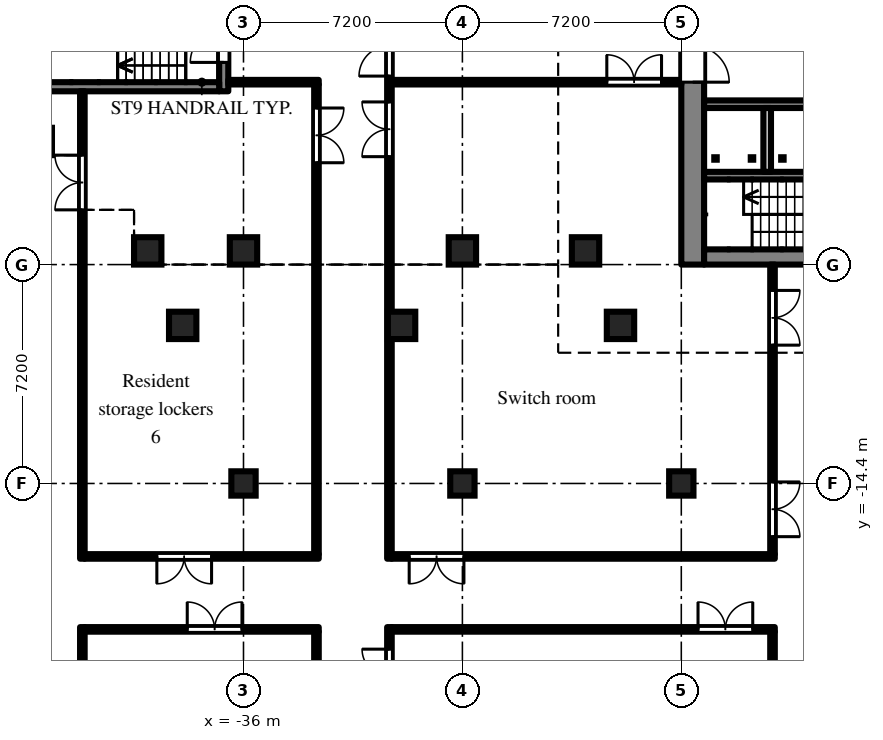
"""IFC4 building model, lengths in metres.
Left out: names, types, materials, properties, quantities, classifications, styles, units other than length and angle.
Written with IfcOpenShell. Run it as: python <this file> out.ifc"""

import sys

from ifc_helpers import new_model, si_unit, direction, frame, frame_2d, origin, origin_2d, place, context, subcontext, project, spatial, rectangle, extrude, element, fill, save


model = new_model("IFC4")
c1 = context("Model", 3, precision=1e-05, world=origin(), true_north=direction((0.0, 1.0)))
c2 = subcontext(c1, "Body", "Model", "MODEL_VIEW")
j1 = project(units=[si_unit("LENGTHUNIT", "METRE"), si_unit("PLANEANGLEUNIT", "RADIAN")], contexts=[c1])
p1 = place(None, origin())
s1 = spatial("IfcSite", under=j1, at=p1, CompositionType="ELEMENT")
p2 = place(p1, origin())
s2 = spatial("IfcBuilding", under=s1, at=p2, CompositionType="ELEMENT")
p3 = place(p2, frame((0.0, 0.0, -4.8)))
s3 = spatial("IfcBuildingStorey", under=s2, at=p3, CompositionType="ELEMENT", Elevation=-4.8)
for number, where, z_axis, x_axis in (
    (1, (-39.15, -6.75, -0.5), (0.0, 0.0, 1.0), (1.0, 0.0, 0.0)),
    (2, (-36.0, -6.75, -0.5), (0.0, 0.0, 1.0), (1.0, 0.0, 0.0)),
    (3, (-28.8, -6.75, -0.5), (0.0, 0.0, 1.0), (1.0, 0.0, 0.0)),
    (4, (-24.75, -6.75, -0.5), (0.0, 0.0, 1.0), (1.0, 0.0, 0.0)),
):
    element("IfcColumn", number, at=place(p3, frame(where, z_axis=z_axis, x_axis=x_axis)), inside=s3, PredefinedType="COLUMN", context=c2, shape_type="SweptSolid", body=[
        extrude(rectangle(XDim=0.9, YDim=0.9, at=origin_2d()), origin(), (0.0, 0.0, 1.0), 5.3),
    ])
for number, where, z_axis, x_axis in (
    (5, (-36.0, -14.4, -0.5), (0.0, 0.0, 1.0), (1.0, 0.0, 0.0)),
    (6, (-28.8, -14.4, -0.5), (0.0, 0.0, 1.0), (1.0, 0.0, 0.0)),
    (7, (-21.6, -14.4, -0.5), (0.0, 0.0, 1.0), (1.0, 0.0, 0.0)),
):
    element("IfcColumn", number, at=place(p3, frame(where, z_axis=z_axis, x_axis=x_axis)), inside=s3, PredefinedType="COLUMN", context=c2, shape_type="SweptSolid", body=[
        extrude(rectangle(XDim=0.8, YDim=0.8, at=origin_2d()), origin(), (0.0, 0.0, 1.0), 5.3),
    ])
for number, where, z_axis, x_axis in (
    (8, (-38.0, -9.2, -0.5), (0.0, 0.0, 1.0), (1.0, 0.0, 0.0)),
    (9, (-30.8, -9.2, -0.5), (0.0, 0.0, 1.0), (1.0, 0.0, 0.0)),
    (10, (-23.6, -9.2, -0.5), (0.0, 0.0, 1.0), (1.0, 0.0, 0.0)),
):
    element("IfcColumn", number, at=place(p3, frame(where, z_axis=z_axis, x_axis=x_axis)), inside=s3, PredefinedType="COLUMN", context=c2, shape_type="SweptSolid", body=[
        extrude(rectangle(XDim=0.9, YDim=0.9, at=origin_2d()), origin(), (0.0, 0.0, 1.0), 5.3),
    ])
p4 = place(p3, frame((-21.225, -7.2, 0.0), z_axis=(0.0, 0.0, 1.0), x_axis=(0.0, 1.0, 0.0)))
e11 = element("IfcWall", 11, at=p4, inside=s3, PredefinedType="SHEAR", context=c2, shape_type="SweptSolid", body=[
    extrude(rectangle(XDim=14.4, YDim=0.75, at=frame_2d((7.2, 0.0))), origin(), (0.0, 0.0, 1.0), 4.35),
])
p5 = place(p4, frame((6.0, 0.0, 0.0)))
e12 = element("IfcOpeningElement", 12, at=p5, cuts=e11, PredefinedType="OPENING", context=c2, shape_type="SweptSolid", body=[
    extrude(rectangle(XDim=2.4, YDim=2.2, at=frame_2d((1.2, 1.1))), frame((0.0, 0.385, 0.0), z_axis=(0.0, -1.0, 0.0), x_axis=(1.0, 0.0, 0.0)), (0.0, 0.0, 1.0), 0.77),
])
p6 = place(p3, frame((-7.9, -6.95, 0.0), z_axis=(0.0, 0.0, 1.0), x_axis=(-1.0, 0.0, 0.0)))
e13 = element("IfcWall", 13, at=p6, inside=s3, PredefinedType="SHEAR", context=c2, shape_type="SweptSolid", body=[
    extrude(rectangle(XDim=12.95, YDim=0.5, at=frame_2d((6.475, 0.0))), origin(), (0.0, 0.0, 1.0), 4.35),
])
p7 = place(p3, frame((-7.9, -1.925, 0.0), z_axis=(0.0, 0.0, 1.0), x_axis=(-1.0, 0.0, 0.0)))
e14 = element("IfcWall", 14, at=p7, inside=s3, PredefinedType="SHEAR", context=c2, shape_type="SweptSolid", body=[
    extrude(rectangle(XDim=12.95, YDim=0.25, at=frame_2d((6.475, 0.0))), origin(), (0.0, 0.0, 1.0), 4.35),
])
p8 = place(p7, frame((0.525, 0.0, 0.0)))
e15 = element("IfcOpeningElement", 15, at=p8, cuts=e14, PredefinedType="OPENING", context=c2, shape_type="SweptSolid", body=[
    extrude(rectangle(XDim=0.9, YDim=2.1, at=frame_2d((0.45, 1.05))), frame((0.0, 0.135, 0.0), z_axis=(0.0, -1.0, 0.0), x_axis=(1.0, 0.0, 0.0)), (0.0, 0.0, 1.0), 0.27),
])
p9 = place(p7, frame((2.625, 0.0, 0.0)))
e16 = element("IfcOpeningElement", 16, at=p9, cuts=e14, PredefinedType="OPENING", context=c2, shape_type="SweptSolid", body=[
    extrude(rectangle(XDim=1.1, YDim=2.1, at=frame_2d((0.55, 1.05))), frame((0.0, 0.135, 0.0), z_axis=(0.0, -1.0, 0.0), x_axis=(1.0, 0.0, 0.0)), (0.0, 0.0, 1.0), 0.27),
])
p10 = place(p3, frame((-12.3, -4.275, 0.0), z_axis=(0.0, 0.0, 1.0), x_axis=(-1.0, 0.0, 0.0)))
e17 = element("IfcWall", 17, at=p10, inside=s3, PredefinedType="SHEAR", context=c2, shape_type="SweptSolid", body=[
    extrude(rectangle(XDim=8.55, YDim=0.25, at=frame_2d((4.275, 0.0))), origin(), (0.0, 0.0, 1.0), 4.35),
])
p11 = place(p3, frame((-18.775, -2.05, 0.0), z_axis=(0.0, 0.0, 1.0), x_axis=(0.0, -1.0, 0.0)))
e18 = element("IfcWall", 18, at=p11, inside=s3, PredefinedType="PARTITIONING", context=c2, shape_type="SweptSolid", body=[
    extrude(rectangle(XDim=2.1, YDim=0.25, at=frame_2d((1.05, 0.0))), origin(), (0.0, 0.0, 1.0), 4.35),
])
p12 = place(p3, frame((-36.65, -1.5, 0.0), z_axis=(0.0, 0.0, 1.0), x_axis=(0.0, 1.0, 0.0)))
e19 = element("IfcWall", 19, at=p12, inside=s3, PredefinedType="SHEAR", context=c2, shape_type="SweptSolid", body=[
    extrude(rectangle(XDim=3.0, YDim=0.3, at=frame_2d((1.5, 0.0))), origin(), (0.0, 0.0, 1.0), 4.35),
])
p13 = place(p12, frame((0.95, 0.0, 0.0)))
e20 = element("IfcOpeningElement", 20, at=p13, cuts=e19, PredefinedType="OPENING", context=c2, shape_type="SweptSolid", body=[
    extrude(rectangle(XDim=1.1, YDim=2.1, at=frame_2d((0.55, 1.05))), frame((0.0, 0.16, 0.0), z_axis=(0.0, -1.0, 0.0), x_axis=(1.0, 0.0, 0.0)), (0.0, 0.0, 1.0), 0.32),
])
p14 = place(p3, frame((-36.8, -1.35, 0.0), z_axis=(0.0, 0.0, 1.0), x_axis=(-1.0, 0.0, 0.0)))
e21 = element("IfcWall", 21, at=p14, inside=s3, PredefinedType="SHEAR", context=c2, shape_type="SweptSolid", body=[
    extrude(rectangle(XDim=5.8, YDim=0.3, at=frame_2d((2.9, 0.0))), origin(), (0.0, 0.0, 1.0), 4.35),
])
p15 = place(p3, frame((-41.3, -31.275, 0.0), z_axis=(0.0, 0.0, 1.0), x_axis=(0.0, 1.0, 0.0)))
e22 = element("IfcWall", 22, at=p15, inside=s3, PredefinedType="PARTITIONING", context=c2, shape_type="SweptSolid", body=[
    extrude(rectangle(XDim=12.15, YDim=0.15, at=frame_2d((6.075, 0.0))), origin(), (0.0, 0.0, 1.0), 4.35),
])
p16 = place(p3, frame((-41.225, -19.2, 0.0), z_axis=(0.0, 0.0, 1.0), x_axis=(1.0, 0.0, 0.0)))
e23 = element("IfcWall", 23, at=p16, inside=s3, PredefinedType="PARTITIONING", context=c2, shape_type="SweptSolid", body=[
    extrude(rectangle(XDim=7.7, YDim=0.15, at=frame_2d((3.85, 0.0))), origin(), (0.0, 0.0, 1.0), 4.35),
])
p17 = place(p16, frame((3.375, 0.0, 0.0)))
e24 = element("IfcOpeningElement", 24, at=p17, cuts=e23, PredefinedType="OPENING", context=c2, shape_type="SweptSolid", body=[
    extrude(rectangle(XDim=1.8, YDim=2.1, at=frame_2d((0.9, 1.05))), frame((0.0, 0.085, 0.0), z_axis=(0.0, -1.0, 0.0), x_axis=(1.0, 0.0, 0.0)), (0.0, 0.0, 1.0), 0.17),
])
p18 = place(p3, frame((-41.3, -16.875, 0.0), z_axis=(0.0, 0.0, 1.0), x_axis=(0.0, 1.0, 0.0)))
e25 = element("IfcWall", 25, at=p18, inside=s3, PredefinedType="PARTITIONING", context=c2, shape_type="SweptSolid", body=[
    extrude(rectangle(XDim=15.375, YDim=0.15, at=frame_2d((7.688, 0.0))), origin(), (0.0, 0.0, 1.0), 4.35),
])
p19 = place(p18, frame((11.475, 0.0, 0.0)))
e26 = element("IfcOpeningElement", 26, at=p19, cuts=e25, PredefinedType="OPENING", context=c2, shape_type="SweptSolid", body=[
    extrude(rectangle(XDim=1.8, YDim=2.1, at=frame_2d((0.9, 1.05))), frame((0.0, 0.085, 0.0), z_axis=(0.0, -1.0, 0.0), x_axis=(1.0, 0.0, 0.0)), (0.0, 0.0, 1.0), 0.17),
])
p20 = place(p3, frame((-41.225, -16.8, 0.0), z_axis=(0.0, 0.0, 1.0), x_axis=(1.0, 0.0, 0.0)))
e27 = element("IfcWall", 27, at=p20, inside=s3, PredefinedType="PARTITIONING", context=c2, shape_type="SweptSolid", body=[
    extrude(rectangle(XDim=7.7, YDim=0.15, at=frame_2d((3.85, 0.0))), origin(), (0.0, 0.0, 1.0), 4.35),
])
p21 = place(p20, frame((2.375, 0.0, 0.0)))
e28 = element("IfcOpeningElement", 28, at=p21, cuts=e27, PredefinedType="OPENING", context=c2, shape_type="SweptSolid", body=[
    extrude(rectangle(XDim=1.8, YDim=2.1, at=frame_2d((0.9, 1.05))), frame((0.0, 0.085, 0.0), z_axis=(0.0, -1.0, 0.0), x_axis=(1.0, 0.0, 0.0)), (0.0, 0.0, 1.0), 0.17),
])
p22 = place(p3, frame((-36.5, -1.2, 0.0), z_axis=(0.0, 0.0, 1.0), x_axis=(1.0, 0.0, 0.0)))
e29 = element("IfcWall", 29, at=p22, inside=s3, PredefinedType="PARTITIONING", context=c2, shape_type="SweptSolid", body=[
    extrude(rectangle(XDim=2.975, YDim=0.15, at=frame_2d((1.488, 0.0))), origin(), (0.0, 0.0, 1.0), 4.35),
])
p23 = place(p3, frame((-33.6, -31.125, 0.0), z_axis=(0.0, 0.0, 1.0), x_axis=(0.0, 1.0, 0.0)))
e30 = element("IfcWall", 30, at=p23, inside=s3, PredefinedType="PARTITIONING", context=c2, shape_type="SweptSolid", body=[
    extrude(rectangle(XDim=11.85, YDim=0.15, at=frame_2d((5.925, 0.0))), origin(), (0.0, 0.0, 1.0), 4.35),
])
p24 = place(p3, frame((-33.6, -16.725, 0.0), z_axis=(0.0, 0.0, 1.0), x_axis=(0.0, 1.0, 0.0)))
e31 = element("IfcWall", 31, at=p24, inside=s3, PredefinedType="PARTITIONING", context=c2, shape_type="SweptSolid", body=[
    extrude(rectangle(XDim=15.45, YDim=0.15, at=frame_2d((7.725, 0.0))), origin(), (0.0, 0.0, 1.0), 4.35),
])
p25 = place(p24, frame((12.875, 0.0, 0.0)))
e32 = element("IfcOpeningElement", 32, at=p25, cuts=e31, PredefinedType="OPENING", context=c2, shape_type="SweptSolid", body=[
    extrude(rectangle(XDim=1.8, YDim=2.1, at=frame_2d((0.9, 1.05))), frame((0.0, 0.085, 0.0), z_axis=(0.0, -1.0, 0.0), x_axis=(1.0, 0.0, 0.0)), (0.0, 0.0, 1.0), 0.17),
])
p26 = place(p3, frame((-31.2, -31.275, 0.0), z_axis=(0.0, 0.0, 1.0), x_axis=(0.0, 1.0, 0.0)))
e33 = element("IfcWall", 33, at=p26, inside=s3, PredefinedType="PARTITIONING", context=c2, shape_type="SweptSolid", body=[
    extrude(rectangle(XDim=12.15, YDim=0.15, at=frame_2d((6.075, 0.0))), origin(), (0.0, 0.0, 1.0), 4.35),
])
p27 = place(p26, frame((9.625, 0.0, 0.0)))
e34 = element("IfcOpeningElement", 34, at=p27, cuts=e33, PredefinedType="OPENING", context=c2, shape_type="SweptSolid", body=[
    extrude(rectangle(XDim=1.8, YDim=2.1, at=frame_2d((0.9, 1.05))), frame((0.0, 0.085, 0.0), z_axis=(0.0, -1.0, 0.0), x_axis=(1.0, 0.0, 0.0)), (0.0, 0.0, 1.0), 0.17),
])
p28 = place(p3, frame((-31.125, -19.2, 0.0), z_axis=(0.0, 0.0, 1.0), x_axis=(1.0, 0.0, 0.0)))
e35 = element("IfcWall", 35, at=p28, inside=s3, PredefinedType="PARTITIONING", context=c2, shape_type="SweptSolid", body=[
    extrude(rectangle(XDim=12.6, YDim=0.15, at=frame_2d((6.3, 0.0))), origin(), (0.0, 0.0, 1.0), 4.35),
])
p29 = place(p28, frame((10.075, 0.0, 0.0)))
e36 = element("IfcOpeningElement", 36, at=p29, cuts=e35, PredefinedType="OPENING", context=c2, shape_type="SweptSolid", body=[
    extrude(rectangle(XDim=1.8, YDim=2.1, at=frame_2d((0.9, 1.05))), frame((0.0, 0.085, 0.0), z_axis=(0.0, -1.0, 0.0), x_axis=(1.0, 0.0, 0.0)), (0.0, 0.0, 1.0), 0.17),
])
p30 = place(p3, frame((-31.2, -16.875, 0.0), z_axis=(0.0, 0.0, 1.0), x_axis=(0.0, 1.0, 0.0)))
e37 = element("IfcWall", 37, at=p30, inside=s3, PredefinedType="PARTITIONING", context=c2, shape_type="SweptSolid", body=[
    extrude(rectangle(XDim=33.75, YDim=0.15, at=frame_2d((16.875, 0.0))), origin(), (0.0, 0.0, 1.0), 4.35),
])
p31 = place(p30, frame((15.875, 0.0, 0.0)))
e38 = element("IfcOpeningElement", 38, at=p31, cuts=e37, PredefinedType="OPENING", context=c2, shape_type="SweptSolid", body=[
    extrude(rectangle(XDim=2.0, YDim=2.1, at=frame_2d((1.0, 1.05))), frame((0.0, 0.085, 0.0), z_axis=(0.0, -1.0, 0.0), x_axis=(1.0, 0.0, 0.0)), (0.0, 0.0, 1.0), 0.17),
])
p32 = place(p30, frame((31.225, 0.0, 0.0)))
e39 = element("IfcOpeningElement", 39, at=p32, cuts=e37, PredefinedType="OPENING", context=c2, shape_type="SweptSolid", body=[
    extrude(rectangle(XDim=1.8, YDim=2.1, at=frame_2d((0.9, 1.05))), frame((0.0, 0.085, 0.0), z_axis=(0.0, -1.0, 0.0), x_axis=(1.0, 0.0, 0.0)), (0.0, 0.0, 1.0), 0.17),
])
p33 = place(p30, frame((13.225, 0.0, 0.0)))
e40 = element("IfcOpeningElement", 40, at=p33, cuts=e37, PredefinedType="OPENING", context=c2, shape_type="SweptSolid", body=[
    extrude(rectangle(XDim=1.8, YDim=2.1, at=frame_2d((0.9, 1.05))), frame((0.0, 0.085, 0.0), z_axis=(0.0, -1.0, 0.0), x_axis=(1.0, 0.0, 0.0)), (0.0, 0.0, 1.0), 0.17),
])
p34 = place(p3, frame((-31.125, -16.8, 0.0), z_axis=(0.0, 0.0, 1.0), x_axis=(1.0, 0.0, 0.0)))
e41 = element("IfcWall", 41, at=p34, inside=s3, PredefinedType="PARTITIONING", context=c2, shape_type="SweptSolid", body=[
    extrude(rectangle(XDim=12.6, YDim=0.15, at=frame_2d((6.3, 0.0))), origin(), (0.0, 0.0, 1.0), 4.35),
])
p35 = place(p34, frame((0.575, 0.0, 0.0)))
e42 = element("IfcOpeningElement", 42, at=p35, cuts=e41, PredefinedType="OPENING", context=c2, shape_type="SweptSolid", body=[
    extrude(rectangle(XDim=1.8, YDim=2.1, at=frame_2d((0.9, 1.05))), frame((0.0, 0.085, 0.0), z_axis=(0.0, -1.0, 0.0), x_axis=(1.0, 0.0, 0.0)), (0.0, 0.0, 1.0), 0.17),
])
p36 = place(p3, frame((-31.125, -1.2, 0.0), z_axis=(0.0, 0.0, 1.0), x_axis=(1.0, 0.0, 0.0)))
e43 = element("IfcWall", 43, at=p36, inside=s3, PredefinedType="PARTITIONING", context=c2, shape_type="SweptSolid", body=[
    extrude(rectangle(XDim=9.525, YDim=0.15, at=frame_2d((4.762, 0.0))), origin(), (0.0, 0.0, 1.0), 4.35),
])
p37 = place(p36, frame((7.075, 0.0, 0.0)))
e44 = element("IfcOpeningElement", 44, at=p37, cuts=e43, PredefinedType="OPENING", context=c2, shape_type="SweptSolid", body=[
    extrude(rectangle(XDim=1.8, YDim=2.1, at=frame_2d((0.9, 1.05))), frame((0.0, 0.085, 0.0), z_axis=(0.0, -1.0, 0.0), x_axis=(1.0, 0.0, 0.0)), (0.0, 0.0, 1.0), 0.17),
])
p38 = place(p3, frame((-18.6, -31.125, 0.0), z_axis=(0.0, 0.0, 1.0), x_axis=(0.0, 1.0, 0.0)))
e45 = element("IfcWall", 45, at=p38, inside=s3, PredefinedType="PARTITIONING", context=c2, shape_type="SweptSolid", body=[
    extrude(rectangle(XDim=11.85, YDim=0.15, at=frame_2d((5.925, 0.0))), origin(), (0.0, 0.0, 1.0), 4.35),
])
p39 = place(p38, frame((0.575, 0.0, 0.0)))
e46 = element("IfcOpeningElement", 46, at=p39, cuts=e45, PredefinedType="OPENING", context=c2, shape_type="SweptSolid", body=[
    extrude(rectangle(XDim=1.8, YDim=2.1, at=frame_2d((0.9, 1.05))), frame((0.0, 0.085, 0.0), z_axis=(0.0, -1.0, 0.0), x_axis=(1.0, 0.0, 0.0)), (0.0, 0.0, 1.0), 0.17),
])
p40 = place(p3, frame((-18.6, -16.725, 0.0), z_axis=(0.0, 0.0, 1.0), x_axis=(0.0, 1.0, 0.0)))
e47 = element("IfcWall", 47, at=p40, inside=s3, PredefinedType="PARTITIONING", context=c2, shape_type="SweptSolid", body=[
    extrude(rectangle(XDim=9.525, YDim=0.15, at=frame_2d((4.763, 0.0))), origin(), (0.0, 0.0, 1.0), 4.35),
])
p41 = place(p40, frame((0.575, 0.0, 0.0)))
e48 = element("IfcOpeningElement", 48, at=p41, cuts=e47, PredefinedType="OPENING", context=c2, shape_type="SweptSolid", body=[
    extrude(rectangle(XDim=1.8, YDim=2.1, at=frame_2d((0.9, 1.05))), frame((0.0, 0.085, 0.0), z_axis=(0.0, -1.0, 0.0), x_axis=(1.0, 0.0, 0.0)), (0.0, 0.0, 1.0), 0.17),
])
p42 = place(p40, frame((6.875, 0.0, 0.0)))
e49 = element("IfcOpeningElement", 49, at=p42, cuts=e47, PredefinedType="OPENING", context=c2, shape_type="SweptSolid", body=[
    extrude(rectangle(XDim=1.8, YDim=2.1, at=frame_2d((0.9, 1.05))), frame((0.0, 0.085, 0.0), z_axis=(0.0, -1.0, 0.0), x_axis=(1.0, 0.0, 0.0)), (0.0, 0.0, 1.0), 0.17),
])
p43 = place(p5, frame((2.4, 0.0, 0.0), z_axis=(0.0, 0.0, 1.0), x_axis=(-1.0, 0.0, 0.0)))
e50 = element("IfcDoor", 50, at=p43, inside=s3, OperationType="DOUBLE_DOOR_DOUBLE_SWING", PredefinedType="DOOR", context=c2, shape_type="SweptSolid", body=[
    extrude(rectangle(XDim=2.4, YDim=2.2, at=frame_2d((1.2, 1.1))), frame((0.0, 0.025, 0.0), z_axis=(0.0, -1.0, 0.0), x_axis=(1.0, 0.0, 0.0)), (0.0, 0.0, 1.0), 0.05),
])
fill(e12, e50)
p44 = place(p13, origin())
e51 = element("IfcDoor", 51, at=p44, inside=s3, OperationType="SINGLE_SWING_LEFT", PredefinedType="DOOR", context=c2, shape_type="SweptSolid", body=[
    extrude(rectangle(XDim=1.1, YDim=2.1, at=frame_2d((0.55, 1.05))), frame((0.0, 0.025, 0.0), z_axis=(0.0, -1.0, 0.0), x_axis=(1.0, 0.0, 0.0)), (0.0, 0.0, 1.0), 0.05),
])
fill(e20, e51)
p45 = place(p31, origin())
e52 = element("IfcDoor", 52, at=p45, inside=s3, OperationType="DOUBLE_DOOR_DOUBLE_SWING", PredefinedType="DOOR", context=c2, shape_type="SweptSolid", body=[
    extrude(rectangle(XDim=2.0, YDim=2.1, at=frame_2d((1.0, 1.05))), frame((0.0, 0.025, 0.0), z_axis=(0.0, -1.0, 0.0), x_axis=(1.0, 0.0, 0.0)), (0.0, 0.0, 1.0), 0.05),
])
fill(e38, e52)
p46 = place(p33, origin())
e53 = element("IfcDoor", 53, at=p46, inside=s3, OperationType="DOUBLE_DOOR_DOUBLE_SWING", PredefinedType="DOOR", context=c2, shape_type="SweptSolid", body=[
    extrude(rectangle(XDim=1.8, YDim=2.1, at=frame_2d((0.9, 1.05))), frame((0.0, 0.025, 0.0), z_axis=(0.0, -1.0, 0.0), x_axis=(1.0, 0.0, 0.0)), (0.0, 0.0, 1.0), 0.05),
])
fill(e40, e53)
p47 = place(p35, frame((1.8, 0.0, 0.0), z_axis=(0.0, 0.0, 1.0), x_axis=(-1.0, 0.0, 0.0)))
e54 = element("IfcDoor", 54, at=p47, inside=s3, OperationType="DOUBLE_DOOR_DOUBLE_SWING", PredefinedType="DOOR", context=c2, shape_type="SweptSolid", body=[
    extrude(rectangle(XDim=1.8, YDim=2.1, at=frame_2d((0.9, 1.05))), frame((0.0, 0.025, 0.0), z_axis=(0.0, -1.0, 0.0), x_axis=(1.0, 0.0, 0.0)), (0.0, 0.0, 1.0), 0.05),
])
fill(e42, e54)
p48 = place(p37, origin())
e55 = element("IfcDoor", 55, at=p48, inside=s3, OperationType="DOUBLE_DOOR_DOUBLE_SWING", PredefinedType="DOOR", context=c2, shape_type="SweptSolid", body=[
    extrude(rectangle(XDim=1.8, YDim=2.1, at=frame_2d((0.9, 1.05))), frame((0.0, 0.025, 0.0), z_axis=(0.0, -1.0, 0.0), x_axis=(1.0, 0.0, 0.0)), (0.0, 0.0, 1.0), 0.05),
])
fill(e44, e55)
p49 = place(p41, frame((1.8, 0.0, 0.0), z_axis=(0.0, 0.0, 1.0), x_axis=(-1.0, 0.0, 0.0)))
e56 = element("IfcDoor", 56, at=p49, inside=s3, OperationType="DOUBLE_DOOR_DOUBLE_SWING", PredefinedType="DOOR", context=c2, shape_type="SweptSolid", body=[
    extrude(rectangle(XDim=1.8, YDim=2.1, at=frame_2d((0.9, 1.05))), frame((0.0, 0.025, 0.0), z_axis=(0.0, -1.0, 0.0), x_axis=(1.0, 0.0, 0.0)), (0.0, 0.0, 1.0), 0.05),
])
fill(e48, e56)
p50 = place(p42, frame((1.8, 0.0, 0.0), z_axis=(0.0, 0.0, 1.0), x_axis=(-1.0, 0.0, 0.0)))
e57 = element("IfcDoor", 57, at=p50, inside=s3, OperationType="DOUBLE_DOOR_DOUBLE_SWING", PredefinedType="DOOR", context=c2, shape_type="SweptSolid", body=[
    extrude(rectangle(XDim=1.8, YDim=2.1, at=frame_2d((0.9, 1.05))), frame((0.0, 0.025, 0.0), z_axis=(0.0, -1.0, 0.0), x_axis=(1.0, 0.0, 0.0)), (0.0, 0.0, 1.0), 0.05),
])
fill(e49, e57)
p51 = place(p27, origin())
e58 = element("IfcDoor", 58, at=p51, inside=s3, OperationType="DOUBLE_DOOR_DOUBLE_SWING", PredefinedType="DOOR", context=c2, shape_type="SweptSolid", body=[
    extrude(rectangle(XDim=1.8, YDim=2.1, at=frame_2d((0.9, 1.05))), frame((0.0, 0.025, 0.0), z_axis=(0.0, -1.0, 0.0), x_axis=(1.0, 0.0, 0.0)), (0.0, 0.0, 1.0), 0.05),
])
fill(e34, e58)
p52 = place(p29, origin())
e59 = element("IfcDoor", 59, at=p52, inside=s3, OperationType="DOUBLE_DOOR_DOUBLE_SWING", PredefinedType="DOOR", context=c2, shape_type="SweptSolid", body=[
    extrude(rectangle(XDim=1.8, YDim=2.1, at=frame_2d((0.9, 1.05))), frame((0.0, 0.025, 0.0), z_axis=(0.0, -1.0, 0.0), x_axis=(1.0, 0.0, 0.0)), (0.0, 0.0, 1.0), 0.05),
])
fill(e36, e59)
p53 = place(p19, origin())
e60 = element("IfcDoor", 60, at=p53, inside=s3, OperationType="DOUBLE_DOOR_DOUBLE_SWING", PredefinedType="DOOR", context=c2, shape_type="SweptSolid", body=[
    extrude(rectangle(XDim=1.8, YDim=2.1, at=frame_2d((0.9, 1.05))), frame((0.0, 0.025, 0.0), z_axis=(0.0, -1.0, 0.0), x_axis=(1.0, 0.0, 0.0)), (0.0, 0.0, 1.0), 0.05),
])
fill(e26, e60)
p54 = place(p21, frame((1.8, 0.0, 0.0), z_axis=(0.0, 0.0, 1.0), x_axis=(-1.0, 0.0, 0.0)))
e61 = element("IfcDoor", 61, at=p54, inside=s3, OperationType="DOUBLE_DOOR_DOUBLE_SWING", PredefinedType="DOOR", context=c2, shape_type="SweptSolid", body=[
    extrude(rectangle(XDim=1.8, YDim=2.1, at=frame_2d((0.9, 1.05))), frame((0.0, 0.025, 0.0), z_axis=(0.0, -1.0, 0.0), x_axis=(1.0, 0.0, 0.0)), (0.0, 0.0, 1.0), 0.05),
])
fill(e28, e61)
p55 = place(p25, frame((1.8, 0.0, 0.0), z_axis=(0.0, 0.0, 1.0), x_axis=(-1.0, 0.0, 0.0)))
e62 = element("IfcDoor", 62, at=p55, inside=s3, OperationType="DOUBLE_DOOR_DOUBLE_SWING", PredefinedType="DOOR", context=c2, shape_type="SweptSolid", body=[
    extrude(rectangle(XDim=1.8, YDim=2.1, at=frame_2d((0.9, 1.05))), frame((0.0, 0.025, 0.0), z_axis=(0.0, -1.0, 0.0), x_axis=(1.0, 0.0, 0.0)), (0.0, 0.0, 1.0), 0.05),
])
fill(e32, e62)
p56 = place(p17, origin())
e63 = element("IfcDoor", 63, at=p56, inside=s3, OperationType="DOUBLE_DOOR_DOUBLE_SWING", PredefinedType="DOOR", context=c2, shape_type="SweptSolid", body=[
    extrude(rectangle(XDim=1.8, YDim=2.1, at=frame_2d((0.9, 1.05))), frame((0.0, 0.025, 0.0), z_axis=(0.0, -1.0, 0.0), x_axis=(1.0, 0.0, 0.0)), (0.0, 0.0, 1.0), 0.05),
])
fill(e24, e63)
save(model, sys.argv[1])
